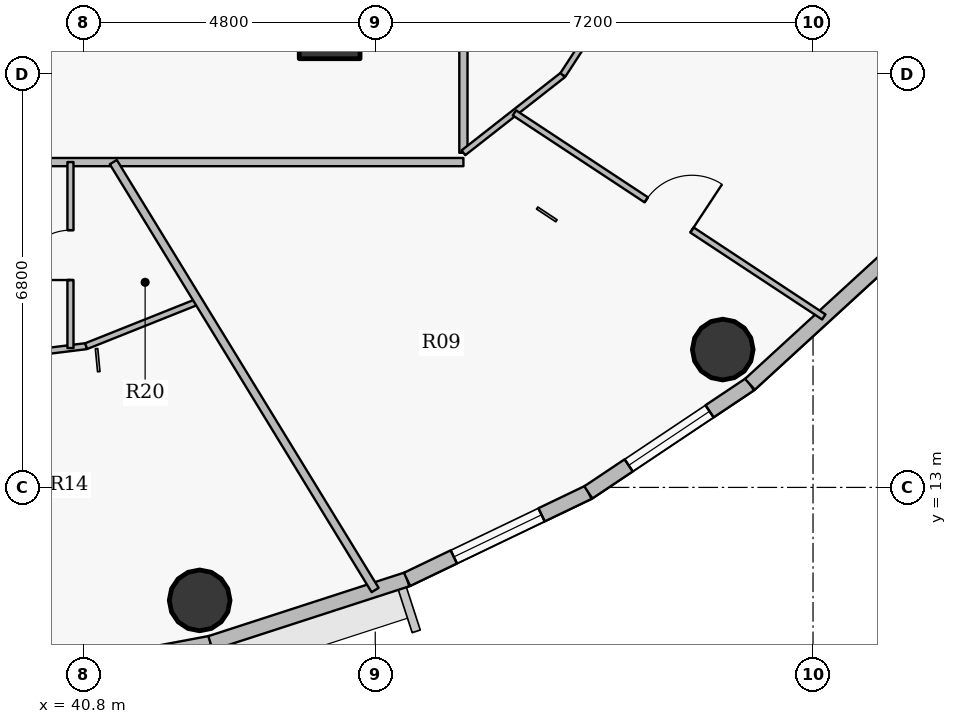
"""IFC4 building model, lengths in metres.
Left out: names, types, materials, properties, quantities, classifications, styles, units other than length and angle.
Written with IfcOpenShell. Run it as: python <this file> out.ifc"""

import sys

from ifc_helpers import new_model, si_unit, direction, frame, frame_2d, origin, origin_2d, place, context, subcontext, project, spatial, rectangle, hollow_circle, extrude, source, transform, mapped, element, fill, save


model = new_model("IFC4")
c1 = context("Model", 3, precision=1e-05, world=origin(), true_north=direction((0.0, 1.0)))
c2 = subcontext(c1, "Body", "Model", "MODEL_VIEW")
j1 = project(units=[si_unit("LENGTHUNIT", "METRE"), si_unit("PLANEANGLEUNIT", "RADIAN")], contexts=[c1])
p1 = place(None, origin())
s1 = spatial("IfcSite", under=j1, at=p1, CompositionType="ELEMENT")
p2 = place(p1, origin())
s2 = spatial("IfcBuilding", under=s1, at=p2, CompositionType="ELEMENT")
p3 = place(p2, frame((0.0, 0.0, 291.75)))
s3 = spatial("IfcBuildingStorey", under=s2, at=p3, CompositionType="ELEMENT", Elevation=291.75)
p4 = place(p3, frame((44.85, 20.55, 0.0), z_axis=(0.0, 0.0, 1.0), x_axis=(1.0, 0.0, 0.0)))
e1 = element("IfcColumn", 1, at=p4, inside=s3, PredefinedType="COLUMN", context=c2, shape_type="SweptSolid", body=[
    extrude(rectangle(XDim=1.0, YDim=1.0, at=origin_2d()), origin(), (0.0, 0.0, 1.0), 3.75),
])
for number, where, z_axis, x_axis in (
    (2, (42.712, 11.142, 0.0), (0.0, 0.0, 1.0), (1.0, 0.0, 0.0)),
    (3, (51.315, 15.267, 0.0), (0.0, 0.0, 1.0), (1.0, 0.0, 0.0)),
):
    element("IfcColumn", number, at=place(p3, frame(where, z_axis=z_axis, x_axis=x_axis)), inside=s3, PredefinedType="COLUMN", context=c2, shape_type="SweptSolid", body=[
        extrude(hollow_circle(Radius=0.5, WallThickness=0.032, at=origin_2d()), origin(), (0.0, 0.0, 1.0), 3.75),
    ])
p5 = place(p3, frame((42.891, 10.44, 0.0), z_axis=(0.0, 0.0, 1.0), x_axis=(-0.982782655757, -0.184765395959, 0.0)))
e4 = element("IfcWall", 4, at=p5, inside=s3, PredefinedType="SOLIDWALL", context=c2, shape_type="SweptSolid", body=[
    extrude(rectangle(XDim=3.462, YDim=0.24, at=frame_2d((1.731, 0.0))), origin(), (0.0, 0.0, 1.0), 3.5),
])
p6 = place(p5, frame((1.106, 0.0, 0.9)))
e5 = element("IfcOpeningElement", 5, at=p6, cuts=e4, PredefinedType="OPENING", context=c2, shape_type="SweptSolid", body=[
    extrude(rectangle(XDim=1.25, YDim=1.65, at=origin_2d()), frame((0.625, 0.13, 0.825), z_axis=(0.0, -1.0, 0.0), x_axis=(1.0, 0.0, 0.0)), (0.0, 0.0, 1.0), 0.26),
])
p7 = place(p3, frame((46.123, 11.488, 0.0), z_axis=(0.0, 0.0, 1.0), x_axis=(-0.95123136723, -0.308478339592, 0.0)))
e6 = element("IfcWall", 6, at=p7, inside=s3, PredefinedType="SOLIDWALL", context=c2, shape_type="SweptSolid", body=[
    extrude(rectangle(XDim=3.398, YDim=0.24, at=frame_2d((1.699, 0.0))), origin(), (0.0, 0.0, 1.0), 3.5),
])
p8 = place(p3, frame((49.104, 12.918, 0.0), z_axis=(0.0, 0.0, 1.0), x_axis=(-0.901573741254, -0.43262546051, 0.0)))
e7 = element("IfcWall", 7, at=p8, inside=s3, PredefinedType="SOLIDWALL", context=c2, shape_type="SweptSolid", body=[
    extrude(rectangle(XDim=3.307, YDim=0.24, at=frame_2d((1.653, 0.0))), origin(), (0.0, 0.0, 1.0), 3.5),
])
p9 = place(p8, frame((0.854, 0.0, 0.9)))
e8 = element("IfcOpeningElement", 8, at=p9, cuts=e7, PredefinedType="OPENING", context=c2, shape_type="SweptSolid", body=[
    extrude(rectangle(XDim=1.6, YDim=1.75, at=origin_2d()), frame((0.8, 0.13, 0.875), z_axis=(0.0, -1.0, 0.0), x_axis=(1.0, 0.0, 0.0)), (0.0, 0.0, 1.0), 0.26),
])
p10 = place(p3, frame((51.762, 14.696, 0.0), z_axis=(0.0, 0.0, 1.0), x_axis=(-0.831250592635, -0.55589787933, 0.0)))
e9 = element("IfcWall", 9, at=p10, inside=s3, PredefinedType="SOLIDWALL", context=c2, shape_type="SweptSolid", body=[
    extrude(rectangle(XDim=3.197, YDim=0.24, at=frame_2d((1.599, 0.0))), origin(), (0.0, 0.0, 1.0), 3.5),
])
p11 = place(p10, frame((0.799, 0.0, 0.9)))
e10 = element("IfcOpeningElement", 10, at=p11, cuts=e9, PredefinedType="OPENING", context=c2, shape_type="SweptSolid", body=[
    extrude(rectangle(XDim=1.6, YDim=1.75, at=origin_2d()), frame((0.8, 0.13, 0.875), z_axis=(0.0, -1.0, 0.0), x_axis=(1.0, 0.0, 0.0)), (0.0, 0.0, 1.0), 0.26),
])
p12 = place(p3, frame((54.03, 16.775, 0.0), z_axis=(0.0, 0.0, 1.0), x_axis=(-0.737068506972, -0.675818034703, 0.0)))
e11 = element("IfcWall", 11, at=p12, inside=s3, PredefinedType="SOLIDWALL", context=c2, shape_type="SweptSolid", body=[
    extrude(rectangle(XDim=3.077, YDim=0.24, at=frame_2d((1.539, 0.0))), origin(), (0.0, 0.0, 1.0), 3.5),
])
p13 = place(p3, frame((24.95, 18.35, 0.0), z_axis=(0.0, 0.0, 1.0), x_axis=(1.0, 0.0, 0.0)))
e12 = element("IfcWall", 12, at=p13, inside=s3, PredefinedType="PARTITIONING", context=c2, shape_type="SweptSolid", body=[
    extrude(rectangle(XDim=22.1, YDim=0.135, at=frame_2d((11.05, 0.0))), origin(), (0.0, 0.0, 1.0), 3.035),
])
p14 = place(p13, frame((6.49, 0.0, 0.0)))
e13 = element("IfcOpeningElement", 13, at=p14, cuts=e12, PredefinedType="OPENING", context=c2, shape_type="SweptSolid", body=[
    extrude(rectangle(XDim=1.0, YDim=2.15, at=origin_2d()), frame((0.5, 0.078, 1.075), z_axis=(0.0, -1.0, 0.0), x_axis=(1.0, 0.0, 0.0)), (0.0, 0.0, 1.0), 0.155),
])
p15 = place(p3, frame((37.342, 14.888, 0.0), z_axis=(0.0, 0.0, 1.0), x_axis=(0.992393420873, 0.123106856865, 0.0)))
e14 = element("IfcWall", 14, at=p15, inside=s3, PredefinedType="PARTITIONING", context=c2, shape_type="SweptSolid", body=[
    extrude(rectangle(XDim=3.53, YDim=0.1, at=frame_2d((1.765, 0.0))), origin(), (0.0, 0.0, 1.0), 3.035),
])
p16 = place(p3, frame((40.587, 15.291, 0.0), z_axis=(0.0, 0.0, 1.0), x_axis=(0.0, 1.0, 0.0)))
e15 = element("IfcWall", 15, at=p16, inside=s3, PredefinedType="PARTITIONING", context=c2, shape_type="SweptSolid", body=[
    extrude(rectangle(XDim=3.059, YDim=0.1, at=frame_2d((1.53, 0.0))), origin(), (0.0, 0.0, 1.0), 3.035),
])
p17 = place(p16, frame((1.119, 0.0, 0.0)))
e16 = element("IfcOpeningElement", 16, at=p17, cuts=e15, PredefinedType="OPENING", context=c2, shape_type="SweptSolid", body=[
    extrude(rectangle(XDim=0.82, YDim=2.1, at=origin_2d()), frame((0.41, 0.06, 1.05), z_axis=(0.0, -1.0, 0.0), x_axis=(1.0, 0.0, 0.0)), (0.0, 0.0, 1.0), 0.12),
])
p18 = place(p3, frame((40.845, 15.323, 0.0), z_axis=(0.0, 0.0, 1.0), x_axis=(0.928797929692, 0.370586569913, 0.0)))
e17 = element("IfcWall", 17, at=p18, inside=s3, PredefinedType="PARTITIONING", context=c2, shape_type="SweptSolid", body=[
    extrude(rectangle(XDim=1.99, YDim=0.1, at=frame_2d((0.995, 0.0))), origin(), (0.0, 0.0, 1.0), 3.035),
])
p19 = place(p3, frame((41.292, 18.35, 0.0), z_axis=(0.0, 0.0, 1.0), x_axis=(0.521891606098, -0.853011812043, 0.0)))
e18 = element("IfcWall", 18, at=p19, inside=s3, PredefinedType="PARTITIONING", context=c2, shape_type="SweptSolid", body=[
    extrude(rectangle(XDim=8.25, YDim=0.135, at=frame_2d((4.125, 0.0))), origin(), (0.0, 0.0, 1.0), 2.985),
])
p20 = place(p3, frame((47.05, 18.503, 0.0), z_axis=(0.0, 0.0, 1.0), x_axis=(0.0, 1.0, 0.0)))
e19 = element("IfcWall", 19, at=p20, inside=s3, PredefinedType="PARTITIONING", context=c2, shape_type="SweptSolid", body=[
    extrude(rectangle(XDim=16.995, YDim=0.135, at=frame_2d((8.497, 0.0))), origin(), (0.0, 0.0, 1.0), 3.035),
])
p21 = place(p20, frame((7.997, 0.0, 0.0)))
e20 = element("IfcOpeningElement", 20, at=p21, cuts=e19, PredefinedType="OPENING", context=c2, shape_type="SweptSolid", body=[
    extrude(rectangle(XDim=1.0, YDim=2.15, at=origin_2d()), frame((0.5, 0.078, 1.075), z_axis=(0.0, -1.0, 0.0), x_axis=(1.0, 0.0, 0.0)), (0.0, 0.0, 1.0), 0.155),
])
p22 = place(p3, frame((47.05, 18.503, 0.0), z_axis=(0.0, 0.0, 1.0), x_axis=(0.787328855274, 0.616533270516, 0.0)))
e21 = element("IfcWall", 21, at=p22, inside=s3, PredefinedType="PARTITIONING", context=c2, shape_type="SweptSolid", body=[
    extrude(rectangle(XDim=2.077, YDim=0.1, at=frame_2d((1.039, 0.0))), origin(), (0.0, 0.0, 1.0), 3.035),
])
p23 = place(p3, frame((47.889, 19.159, 0.0), z_axis=(0.0, 0.0, 1.0), x_axis=(0.834800486956, -0.550552583299, 0.0)))
e22 = element("IfcWall", 22, at=p23, inside=s3, PredefinedType="PARTITIONING", context=c2, shape_type="SweptSolid", body=[
    extrude(rectangle(XDim=6.096, YDim=0.1, at=frame_2d((3.048, 0.0))), origin(), (0.0, 0.0, 1.0), 2.985),
])
p24 = place(p23, frame((2.598, 0.0, 0.0)))
e23 = element("IfcOpeningElement", 23, at=p24, cuts=e22, PredefinedType="OPENING", context=c2, shape_type="SweptSolid", body=[
    extrude(rectangle(XDim=0.9, YDim=2.1, at=origin_2d()), frame((0.45, 0.06, 1.05), z_axis=(0.0, -1.0, 0.0), x_axis=(1.0, 0.0, 0.0)), (0.0, 0.0, 1.0), 0.12),
])
p25 = place(p3, frame((48.685, 19.783, 0.0), z_axis=(0.0, 0.0, 1.0), x_axis=(0.545435886628, 0.838152547916, 0.0)))
e24 = element("IfcWall", 24, at=p25, inside=s3, PredefinedType="PARTITIONING", context=c2, shape_type="SweptSolid", body=[
    extrude(rectangle(XDim=4.083, YDim=0.1, at=frame_2d((2.042, 0.0))), origin(), (0.0, 0.0, 1.0), 3.035),
])
p26 = place(p25, frame((1.592, 0.0, 0.0)))
e25 = element("IfcOpeningElement", 25, at=p26, cuts=e24, PredefinedType="OPENING", context=c2, shape_type="SweptSolid", body=[
    extrude(rectangle(XDim=0.9, YDim=2.1, at=origin_2d()), frame((0.45, 0.06, 1.05), z_axis=(0.0, -1.0, 0.0), x_axis=(1.0, 0.0, 0.0)), (0.0, 0.0, 1.0), 0.12),
])
p27 = place(p3, frame((44.36, 20.2, 0.0), z_axis=(0.0, 0.0, 1.0), x_axis=(1.0, 0.0, 0.0)))
e26 = element("IfcWall", 26, at=p27, inside=s3, PredefinedType="PARTITIONING", context=c2, shape_type="SweptSolid", body=[
    extrude(rectangle(XDim=0.84, YDim=0.135, at=frame_2d((0.42, 0.0))), origin(), (0.0, 0.0, 1.0), 3.035),
])
m1 = source(origin(), c2, "Body", "SweptSolid", [
    extrude(rectangle(XDim=1.6, YDim=1.75, at=origin_2d()), frame((0.8, 0.03, 0.875), z_axis=(0.0, -1.0, 0.0), x_axis=(1.0, 0.0, 0.0)), (0.0, 0.0, 1.0), 0.06),
])
p28 = place(p9, origin())
e27 = element("IfcWindow", 27, at=p28, inside=s3, PartitioningType="DOUBLE_PANEL_VERTICAL", PredefinedType="WINDOW", context=c2, shape_type="MappedRepresentation", body=[
    mapped(m1, transform((0.0, 0.0, 0.0), x_axis=(1.0, 0.0, 0.0), y_axis=(0.0, 1.0, 0.0), z_axis=(0.0, 0.0, 1.0), scale=1.0)),
])
fill(e8, e27)
p29 = place(p11, origin())
e28 = element("IfcWindow", 28, at=p29, inside=s3, PartitioningType="DOUBLE_PANEL_VERTICAL", PredefinedType="WINDOW", context=c2, shape_type="MappedRepresentation", body=[
    mapped(m1, transform((0.0, 0.0, 0.0), x_axis=(1.0, 0.0, 0.0), y_axis=(0.0, 1.0, 0.0), z_axis=(0.0, 0.0, 1.0), scale=1.0)),
])
fill(e10, e28)
m2 = source(origin(), c2, "Body", "SweptSolid", [
    extrude(rectangle(XDim=0.82, YDim=2.1, at=origin_2d()), frame((0.41, 0.025, 1.05), z_axis=(0.0, -1.0, 0.0), x_axis=(1.0, 0.0, 0.0)), (0.0, 0.0, 1.0), 0.05),
])
p30 = place(p17, origin())
e29 = element("IfcDoor", 29, at=p30, inside=s3, OperationType="SINGLE_SWING_LEFT", PredefinedType="DOOR", context=c2, shape_type="MappedRepresentation", body=[
    mapped(m2, transform((0.0, 0.0, 0.0), x_axis=(1.0, 0.0, 0.0), y_axis=(0.0, 1.0, 0.0), z_axis=(0.0, 0.0, 1.0), scale=1.0)),
])
fill(e16, e29)
m3 = source(origin(), c2, "Body", "SweptSolid", [
    extrude(rectangle(XDim=0.9, YDim=2.1, at=origin_2d()), frame((0.45, 0.025, 1.05), z_axis=(0.0, -1.0, 0.0), x_axis=(1.0, 0.0, 0.0)), (0.0, 0.0, 1.0), 0.05),
])
p31 = place(p24, origin())
e30 = element("IfcDoor", 30, at=p31, inside=s3, OperationType="SINGLE_SWING_RIGHT", PredefinedType="DOOR", context=c2, shape_type="MappedRepresentation", body=[
    mapped(m3, transform((0.0, 0.0, 0.0), x_axis=(1.0, 0.0, 0.0), y_axis=(0.0, 1.0, 0.0), z_axis=(0.0, 0.0, 1.0), scale=1.0)),
])
fill(e23, e30)
save(model, sys.argv[1])
